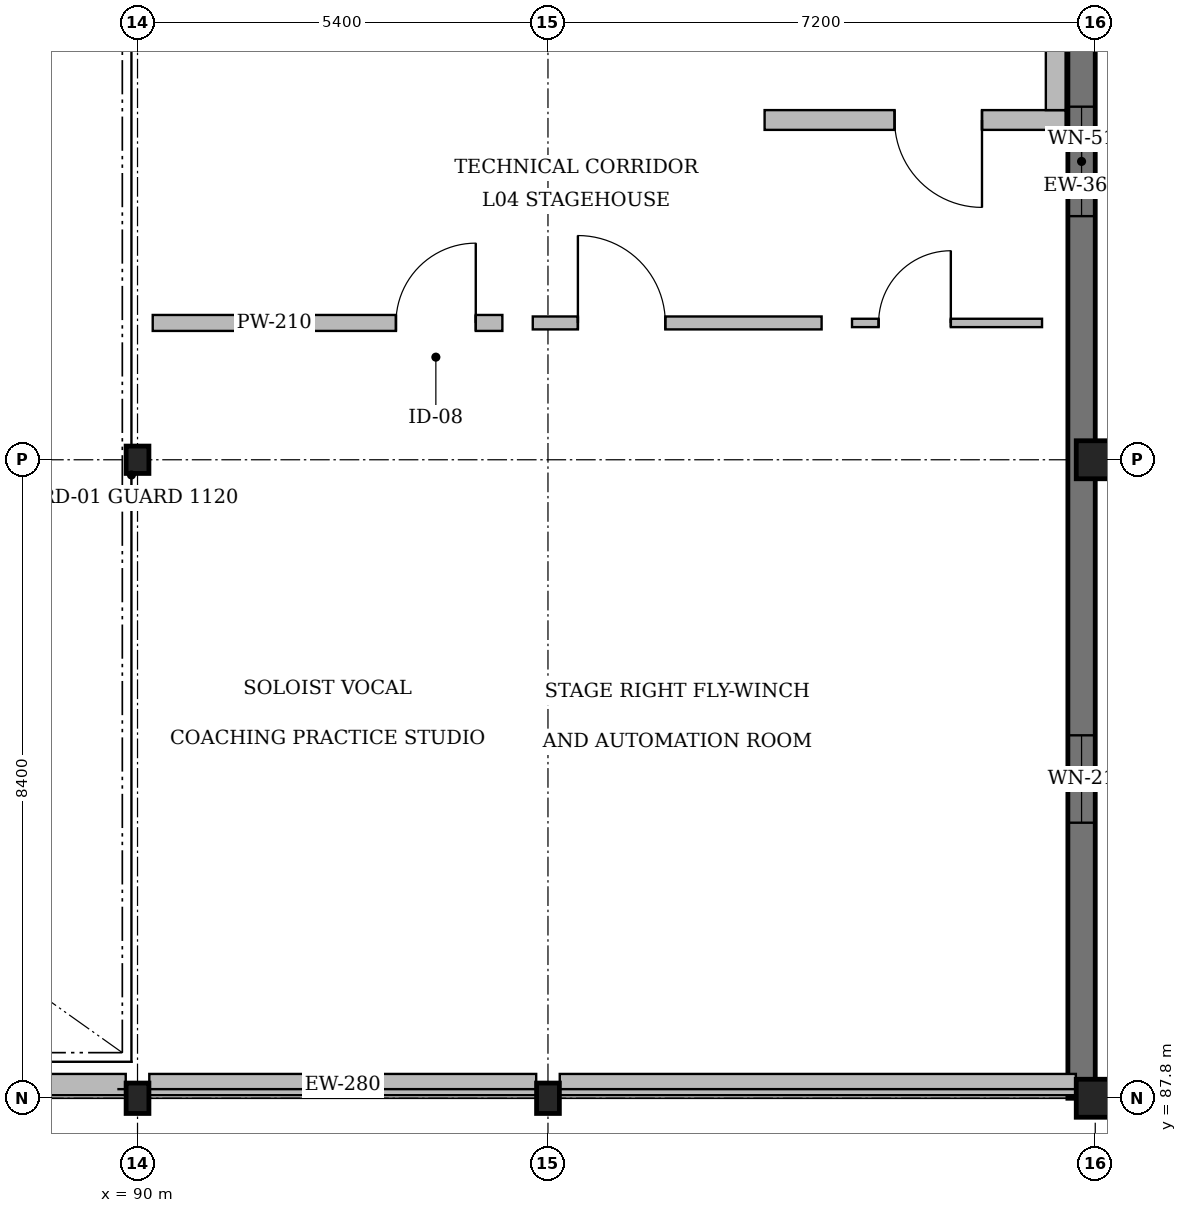
"""IFC4 building model, lengths in metres.
Left out: names, types, materials, properties, quantities, classifications, styles, units other than length and angle.
Written with IfcOpenShell. Run it as: python <this file> out.ifc"""

import sys

from ifc_helpers import new_model, si_unit, direction, frame, frame_2d, origin, origin_2d, place, context, subcontext, project, spatial, rectangle, i_section, extrude, element, fill, save


model = new_model("IFC4")
c1 = context("Model", 3, precision=1e-05, world=origin(), true_north=direction((0.0, 1.0)))
c2 = subcontext(c1, "Body", "Model", "MODEL_VIEW")
j1 = project(units=[si_unit("LENGTHUNIT", "METRE"), si_unit("PLANEANGLEUNIT", "RADIAN")], contexts=[c1])
p1 = place(None, origin())
s1 = spatial("IfcSite", under=j1, at=p1, CompositionType="ELEMENT")
p2 = place(p1, origin())
s2 = spatial("IfcBuilding", under=s1, at=p2, CompositionType="ELEMENT")
p3 = place(p2, frame((0.0, 0.0, 17.1)))
s3 = spatial("IfcBuildingStorey", under=s2, at=p3, CompositionType="ELEMENT", Elevation=17.1)
p4 = place(p3, frame((90.0, 87.8, 0.0), z_axis=(0.0, 0.0, 1.0), x_axis=(1.0, 0.0, 0.0)))
e1 = element("IfcColumn", 1, at=p4, inside=s3, PredefinedType="COLUMN", context=c2, shape_type="SweptSolid", body=[
    extrude(i_section(OverallWidth=0.3, OverallDepth=0.4, WebThickness=0.013, FlangeThickness=0.024, FilletRadius=0.027, at=origin_2d()), origin(), (0.0, 0.0, 1.0), 3.9),
])
p5 = place(p3, frame((90.0, 96.2, 0.0), z_axis=(0.0, 0.0, 1.0), x_axis=(1.0, 0.0, 0.0)))
e2 = element("IfcColumn", 2, at=p5, inside=s3, PredefinedType="COLUMN", context=c2, shape_type="SweptSolid", body=[
    extrude(i_section(OverallWidth=0.3, OverallDepth=0.36, WebThickness=0.012, FlangeThickness=0.022, FilletRadius=0.027, at=origin_2d()), origin(), (0.0, 0.0, 1.0), 3.9),
])
p6 = place(p3, frame((95.4, 87.8, 0.0), z_axis=(0.0, 0.0, 1.0), x_axis=(1.0, 0.0, 0.0)))
e3 = element("IfcColumn", 3, at=p6, inside=s3, PredefinedType="COLUMN", context=c2, shape_type="SweptSolid", body=[
    extrude(i_section(OverallWidth=0.3, OverallDepth=0.4, WebThickness=0.013, FlangeThickness=0.024, FilletRadius=0.027, at=origin_2d()), origin(), (0.0, 0.0, 1.0), 3.9),
])
for number, where, z_axis, x_axis in (
    (4, (102.6, 87.8, 0.0), (0.0, 0.0, 1.0), (1.0, 0.0, 0.0)),
    (5, (102.6, 96.2, 0.0), (0.0, 0.0, 1.0), (1.0, 0.0, 0.0)),
):
    element("IfcColumn", number, at=place(p3, frame(where, z_axis=z_axis, x_axis=x_axis)), inside=s3, PredefinedType="COLUMN", context=c2, shape_type="SweptSolid", body=[
        extrude(rectangle(XDim=0.5, YDim=0.5, at=origin_2d()), origin(), (0.0, 0.0, 1.0), 3.9),
    ])
p7 = place(p3, frame((102.21, 100.67, 0.0), z_axis=(0.0, 0.0, 1.0), x_axis=(-1.0, 0.0, 0.0)))
e6 = element("IfcWall", 6, at=p7, inside=s3, PredefinedType="SOLIDWALL", context=c2, shape_type="SweptSolid", body=[
    extrude(rectangle(XDim=3.96, YDim=0.26, at=frame_2d((1.98, 0.0))), origin(), (0.0, 0.0, 1.0), 3.68),
])
p8 = place(p7, frame((1.1, 0.0, 0.0)))
e7 = element("IfcOpeningElement", 7, at=p8, cuts=e6, PredefinedType="OPENING", context=c2, shape_type="SweptSolid", body=[
    extrude(rectangle(XDim=1.15, YDim=2.2, at=frame_2d((0.575, 1.1))), frame((0.0, 0.15, 0.0), z_axis=(0.0, -1.0, 0.0), x_axis=(1.0, 0.0, 0.0)), (0.0, 0.0, 1.0), 0.3),
])
p9 = place(p3, frame((102.08, 106.65, 0.0), z_axis=(0.0, 0.0, 1.0), x_axis=(0.0, -1.0, 0.0)))
e8 = element("IfcWall", 8, at=p9, inside=s3, PredefinedType="SOLIDWALL", context=c2, shape_type="SweptSolid", body=[
    extrude(rectangle(XDim=5.85, YDim=0.26, at=frame_2d((2.925, 0.0))), origin(), (0.0, 0.0, 1.0), 3.68),
])
p10 = place(p3, frame((102.42, 87.8, 0.0), z_axis=(0.0, 0.0, 1.0), x_axis=(0.0, 1.0, 0.0)))
e9 = element("IfcWall", 9, at=p10, inside=s3, PredefinedType="SOLIDWALL", context=c2, shape_type="SweptSolid", body=[
    extrude(rectangle(XDim=24.0, YDim=0.36, at=frame_2d((12.0, 0.0))), origin(), (0.0, 0.0, 1.0), 3.65),
])
p11 = place(p10, frame((3.625, 0.0, 0.95)))
e10 = element("IfcOpeningElement", 10, at=p11, cuts=e9, PredefinedType="OPENING", context=c2, shape_type="SweptSolid", body=[
    extrude(rectangle(XDim=1.15, YDim=1.95, at=frame_2d((0.575, 0.975))), frame((0.0, 0.2, 0.0), z_axis=(0.0, -1.0, 0.0), x_axis=(1.0, 0.0, 0.0)), (0.0, 0.0, 1.0), 0.4),
])
p12 = place(p10, frame((11.605, 0.0, 0.95)))
e11 = element("IfcOpeningElement", 11, at=p12, cuts=e9, PredefinedType="OPENING", context=c2, shape_type="SweptSolid", body=[
    extrude(rectangle(XDim=1.44, YDim=1.7, at=frame_2d((0.72, 0.85))), frame((0.0, 0.2, 0.0), z_axis=(0.0, -1.0, 0.0), x_axis=(1.0, 0.0, 0.0)), (0.0, 0.0, 1.0), 0.4),
])
p13 = place(p10, frame((19.385, 0.0, 0.95)))
e12 = element("IfcOpeningElement", 12, at=p13, cuts=e9, PredefinedType="OPENING", context=c2, shape_type="SweptSolid", body=[
    extrude(rectangle(XDim=1.38, YDim=1.95, at=frame_2d((0.69, 0.975))), frame((0.0, 0.2, 0.0), z_axis=(0.0, -1.0, 0.0), x_axis=(1.0, 0.0, 0.0)), (0.0, 0.0, 1.0), 0.4),
])
p14 = place(p3, frame((84.755, 87.98, 2.165), z_axis=(0.0, 0.0, 1.0), x_axis=(1.0, 0.0, 0.0)))
e13 = element("IfcWall", 13, at=p14, inside=s3, PredefinedType="SOLIDWALL", context=c2, shape_type="SweptSolid", body=[
    extrude(rectangle(XDim=5.09, YDim=0.28, at=frame_2d((2.545, 0.0))), origin(), (0.0, 0.0, 1.0), 1.108),
])
p15 = place(p3, frame((90.155, 87.98, 0.08), z_axis=(0.0, 0.0, 1.0), x_axis=(1.0, 0.0, 0.0)))
e14 = element("IfcWall", 14, at=p15, inside=s3, PredefinedType="SOLIDWALL", context=c2, shape_type="SweptSolid", body=[
    extrude(rectangle(XDim=5.09, YDim=0.28, at=frame_2d((2.545, 0.0))), origin(), (0.0, 0.0, 1.0), 3.193),
])
p16 = place(p3, frame((95.555, 87.98, 0.0), z_axis=(0.0, 0.0, 1.0), x_axis=(1.0, 0.0, 0.0)))
e15 = element("IfcWall", 15, at=p16, inside=s3, PredefinedType="SOLIDWALL", context=c2, shape_type="SweptSolid", body=[
    extrude(rectangle(XDim=6.79, YDim=0.28, at=frame_2d((3.395, 0.0))), origin(), (0.0, 0.0, 1.0), 3.013),
])
p17 = place(p3, frame((90.2, 98.0, 0.0), z_axis=(0.0, 0.0, 1.0), x_axis=(1.0, 0.0, 0.0)))
e16 = element("IfcWall", 16, at=p17, inside=s3, PredefinedType="PARTITIONING", context=c2, shape_type="SweptSolid", body=[
    extrude(rectangle(XDim=4.6, YDim=0.21, at=frame_2d((2.3, 0.0))), origin(), (0.0, 0.0, 1.0), 3.68),
])
p18 = place(p17, frame((3.2, 0.0, 0.0)))
e17 = element("IfcOpeningElement", 17, at=p18, cuts=e16, PredefinedType="OPENING", context=c2, shape_type="SweptSolid", body=[
    extrude(rectangle(XDim=1.05, YDim=2.25, at=frame_2d((0.525, 1.125))), frame((0.0, 0.125, 0.0), z_axis=(0.0, -1.0, 0.0), x_axis=(1.0, 0.0, 0.0)), (0.0, 0.0, 1.0), 0.25),
])
p19 = place(p3, frame((95.2, 98.0, 0.0), z_axis=(0.0, 0.0, 1.0), x_axis=(1.0, 0.0, 0.0)))
e18 = element("IfcWall", 18, at=p19, inside=s3, PredefinedType="PARTITIONING", context=c2, shape_type="SweptSolid", body=[
    extrude(rectangle(XDim=3.8, YDim=0.17, at=frame_2d((1.9, 0.0))), origin(), (0.0, 0.0, 1.0), 3.68),
])
p20 = place(p19, frame((0.594, 0.0, 0.0)))
e19 = element("IfcOpeningElement", 19, at=p20, cuts=e18, PredefinedType="OPENING", context=c2, shape_type="SweptSolid", body=[
    extrude(rectangle(XDim=1.15, YDim=2.15, at=frame_2d((0.575, 1.075))), frame((0.0, 0.105, 0.0), z_axis=(0.0, -1.0, 0.0), x_axis=(1.0, 0.0, 0.0)), (0.0, 0.0, 1.0), 0.21),
])
p21 = place(p3, frame((99.4, 98.0, 0.0), z_axis=(0.0, 0.0, 1.0), x_axis=(1.0, 0.0, 0.0)))
e20 = element("IfcWall", 20, at=p21, inside=s3, PredefinedType="PARTITIONING", context=c2, shape_type="SweptSolid", body=[
    extrude(rectangle(XDim=2.5, YDim=0.11, at=frame_2d((1.25, 0.0))), origin(), (0.0, 0.0, 1.0), 3.68),
])
p22 = place(p21, frame((0.35, 0.0, 0.0)))
e21 = element("IfcOpeningElement", 21, at=p22, cuts=e20, PredefinedType="OPENING", context=c2, shape_type="SweptSolid", body=[
    extrude(rectangle(XDim=0.95, YDim=2.1, at=frame_2d((0.475, 1.05))), frame((0.0, 0.075, 0.0), z_axis=(0.0, -1.0, 0.0), x_axis=(1.0, 0.0, 0.0)), (0.0, 0.0, 1.0), 0.15),
])
p23 = place(p8, origin())
e22 = element("IfcDoor", 22, at=p23, inside=s3, OperationType="SINGLE_SWING_LEFT", PredefinedType="DOOR", context=c2, shape_type="SweptSolid", body=[
    extrude(rectangle(XDim=1.15, YDim=2.2, at=frame_2d((0.575, 1.1))), frame((0.0, 0.025, 0.0), z_axis=(0.0, -1.0, 0.0), x_axis=(1.0, 0.0, 0.0)), (0.0, 0.0, 1.0), 0.05),
])
fill(e7, e22)
p24 = place(p11, origin())
e23 = element("IfcWindow", 23, at=p24, inside=s3, PartitioningType="SINGLE_PANEL", PredefinedType="WINDOW", context=c2, shape_type="SweptSolid", body=[
    extrude(rectangle(XDim=1.15, YDim=1.95, at=frame_2d((0.575, 0.975))), frame((0.0, 0.03, 0.0), z_axis=(0.0, -1.0, 0.0), x_axis=(1.0, 0.0, 0.0)), (0.0, 0.0, 1.0), 0.06),
])
fill(e10, e23)
p25 = place(p12, origin())
e24 = element("IfcWindow", 24, at=p25, inside=s3, PartitioningType="SINGLE_PANEL", PredefinedType="WINDOW", context=c2, shape_type="SweptSolid", body=[
    extrude(rectangle(XDim=1.44, YDim=1.7, at=frame_2d((0.72, 0.85))), frame((0.0, 0.03, 0.0), z_axis=(0.0, -1.0, 0.0), x_axis=(1.0, 0.0, 0.0)), (0.0, 0.0, 1.0), 0.06),
])
fill(e11, e24)
p26 = place(p18, origin())
e25 = element("IfcDoor", 25, at=p26, inside=s3, OperationType="SINGLE_SWING_RIGHT", PredefinedType="DOOR", context=c2, shape_type="SweptSolid", body=[
    extrude(rectangle(XDim=1.05, YDim=2.25, at=frame_2d((0.525, 1.125))), frame((0.0, 0.025, 0.0), z_axis=(0.0, -1.0, 0.0), x_axis=(1.0, 0.0, 0.0)), (0.0, 0.0, 1.0), 0.05),
])
fill(e17, e25)
p27 = place(p20, origin())
e26 = element("IfcDoor", 26, at=p27, inside=s3, OperationType="SINGLE_SWING_LEFT", PredefinedType="DOOR", context=c2, shape_type="SweptSolid", body=[
    extrude(rectangle(XDim=1.15, YDim=2.15, at=frame_2d((0.575, 1.075))), frame((0.0, 0.025, 0.0), z_axis=(0.0, -1.0, 0.0), x_axis=(1.0, 0.0, 0.0)), (0.0, 0.0, 1.0), 0.05),
])
fill(e19, e26)
p28 = place(p22, origin())
e27 = element("IfcDoor", 27, at=p28, inside=s3, OperationType="SINGLE_SWING_RIGHT", PredefinedType="DOOR", context=c2, shape_type="SweptSolid", body=[
    extrude(rectangle(XDim=0.95, YDim=2.1, at=frame_2d((0.475, 1.05))), frame((0.0, 0.025, 0.0), z_axis=(0.0, -1.0, 0.0), x_axis=(1.0, 0.0, 0.0)), (0.0, 0.0, 1.0), 0.05),
])
fill(e21, e27)
save(model, sys.argv[1])
